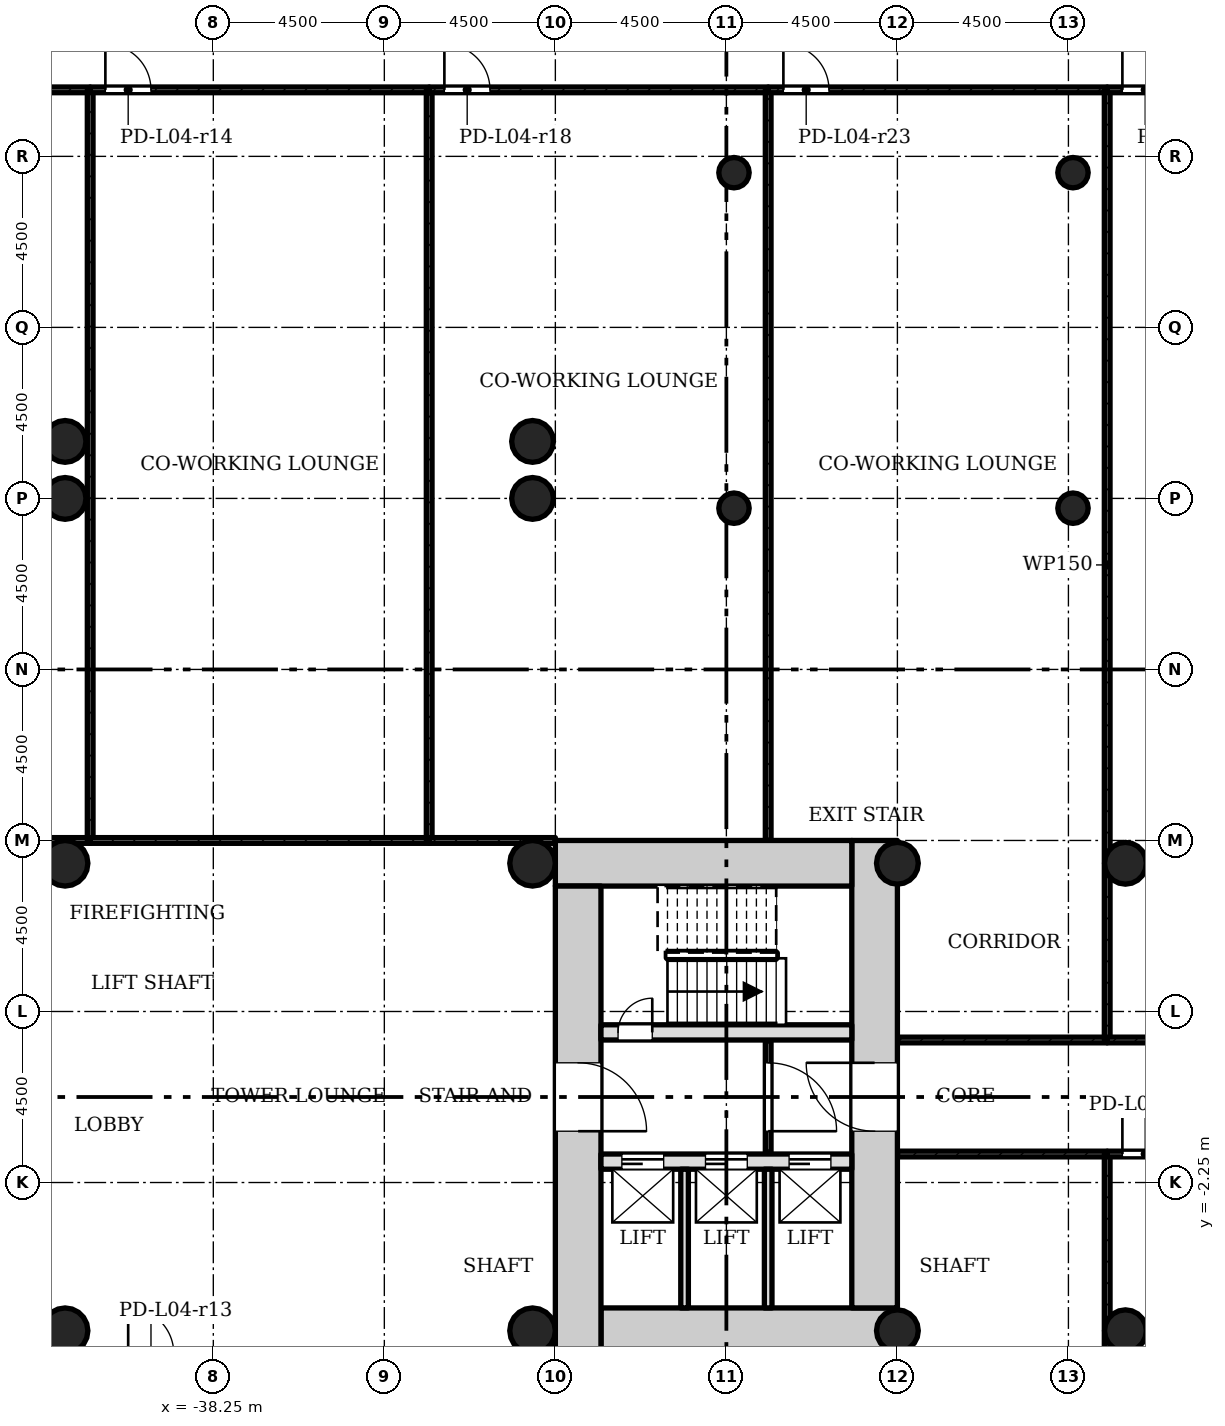
"""IFC4 building model, lengths in metres.
Left out: names, types, materials, properties, quantities, classifications, styles, units other than length and angle.
Written with IfcOpenShell. Run it as: python <this file> out.ifc"""

import sys

from ifc_helpers import new_model, si_unit, direction, frame, frame_2d, origin, origin_2d, place, context, subcontext, project, spatial, rectangle, hollow_circle, extrude, element, fill, save


model = new_model("IFC4")
c1 = context("Model", 3, precision=1e-05, world=origin(), true_north=direction((0.0, 1.0)))
c2 = subcontext(c1, "Body", "Model", "MODEL_VIEW")
j1 = project(units=[si_unit("LENGTHUNIT", "METRE"), si_unit("PLANEANGLEUNIT", "RADIAN")], contexts=[c1])
p1 = place(None, origin())
s1 = spatial("IfcSite", under=j1, at=p1, CompositionType="ELEMENT")
p2 = place(p1, origin())
s2 = spatial("IfcBuilding", under=s1, at=p2, CompositionType="ELEMENT")
p3 = place(p2, frame((0.0, 0.0, 20.0)))
s3 = spatial("IfcBuildingStorey", under=s2, at=p3, CompositionType="ELEMENT", Elevation=20.0)
p4 = place(p3, frame((-28.05, -6.15, 0.0), z_axis=(0.0, 0.0, 1.0), x_axis=(1.0, 0.0, 0.0)))
e1 = element("IfcWall", 1, at=p4, inside=s3, PredefinedType="SHEAR", context=c2, shape_type="SweptSolid", body=[
    extrude(rectangle(XDim=7.8, YDim=1.2, at=frame_2d((3.9, 0.0))), origin(), (0.0, 0.0, 1.0), 4.5),
])
p5 = place(p3, frame((-20.85, -5.55, 0.0), z_axis=(0.0, 0.0, 1.0), x_axis=(0.0, 1.0, 0.0)))
e2 = element("IfcWall", 2, at=p5, inside=s3, PredefinedType="SHEAR", context=c2, shape_type="SweptSolid", body=[
    extrude(rectangle(XDim=12.3, YDim=1.2, at=frame_2d((6.15, 0.0))), origin(), (0.0, 0.0, 1.0), 4.5),
])
p6 = place(p5, frame((4.65, 0.0, 0.0)))
e3 = element("IfcOpeningElement", 3, at=p6, cuts=e2, PredefinedType="OPENING", context=c2, shape_type="SweptSolid", body=[
    extrude(rectangle(XDim=1.8, YDim=2.1, at=frame_2d((0.9, 1.05))), frame((0.0, 0.61, 0.0), z_axis=(0.0, -1.0, 0.0), x_axis=(1.0, 0.0, 0.0)), (0.0, 0.0, 1.0), 1.22),
])
p7 = place(p3, frame((-21.45, 6.15, 0.0), z_axis=(0.0, 0.0, 1.0), x_axis=(-1.0, 0.0, 0.0)))
e4 = element("IfcWall", 4, at=p7, inside=s3, PredefinedType="SHEAR", context=c2, shape_type="SweptSolid", body=[
    extrude(rectangle(XDim=7.8, YDim=1.2, at=frame_2d((3.9, 0.0))), origin(), (0.0, 0.0, 1.0), 4.5),
])
p8 = place(p3, frame((-28.65, 5.55, 0.0), z_axis=(0.0, 0.0, 1.0), x_axis=(0.0, -1.0, 0.0)))
e5 = element("IfcWall", 5, at=p8, inside=s3, PredefinedType="SHEAR", context=c2, shape_type="SweptSolid", body=[
    extrude(rectangle(XDim=12.3, YDim=1.2, at=frame_2d((6.15, 0.0))), origin(), (0.0, 0.0, 1.0), 4.5),
])
p9 = place(p8, frame((4.65, 0.0, 0.0)))
e6 = element("IfcOpeningElement", 6, at=p9, cuts=e5, PredefinedType="OPENING", context=c2, shape_type="SweptSolid", body=[
    extrude(rectangle(XDim=1.8, YDim=2.1, at=frame_2d((0.9, 1.05))), frame((0.0, 0.61, 0.0), z_axis=(0.0, -1.0, 0.0), x_axis=(1.0, 0.0, 0.0)), (0.0, 0.0, 1.0), 1.22),
])
p10 = place(p3, frame((-28.05, -1.7, 0.0), z_axis=(0.0, 0.0, 1.0), x_axis=(1.0, 0.0, 0.0)))
e7 = element("IfcWall", 7, at=p10, inside=s3, PredefinedType="SHEAR", context=c2, shape_type="SweptSolid", body=[
    extrude(rectangle(XDim=6.6, YDim=0.4, at=frame_2d((3.3, 0.0))), origin(), (0.0, 0.0, 1.0), 4.5),
])
p11 = place(p10, frame((0.55, 0.0, 0.0)))
e8 = element("IfcOpeningElement", 8, at=p11, cuts=e7, PredefinedType="OPENING", context=c2, shape_type="SweptSolid", body=[
    extrude(rectangle(XDim=1.1, YDim=2.1, at=frame_2d((0.55, 1.05))), frame((0.0, 0.21, 0.0), z_axis=(0.0, -1.0, 0.0), x_axis=(1.0, 0.0, 0.0)), (0.0, 0.0, 1.0), 0.42),
])
p12 = place(p10, frame((2.75, 0.0, 0.0)))
e9 = element("IfcOpeningElement", 9, at=p12, cuts=e7, PredefinedType="OPENING", context=c2, shape_type="SweptSolid", body=[
    extrude(rectangle(XDim=1.1, YDim=2.1, at=frame_2d((0.55, 1.05))), frame((0.0, 0.21, 0.0), z_axis=(0.0, -1.0, 0.0), x_axis=(1.0, 0.0, 0.0)), (0.0, 0.0, 1.0), 0.42),
])
p13 = place(p10, frame((4.95, 0.0, 0.0)))
e10 = element("IfcOpeningElement", 10, at=p13, cuts=e7, PredefinedType="OPENING", context=c2, shape_type="SweptSolid", body=[
    extrude(rectangle(XDim=1.1, YDim=2.1, at=frame_2d((0.55, 1.05))), frame((0.0, 0.21, 0.0), z_axis=(0.0, -1.0, 0.0), x_axis=(1.0, 0.0, 0.0)), (0.0, 0.0, 1.0), 0.42),
])
p14 = place(p3, frame((-28.05, 1.7, 0.0), z_axis=(0.0, 0.0, 1.0), x_axis=(1.0, 0.0, 0.0)))
e11 = element("IfcWall", 11, at=p14, inside=s3, PredefinedType="SHEAR", context=c2, shape_type="SweptSolid", body=[
    extrude(rectangle(XDim=6.6, YDim=0.4, at=frame_2d((3.3, 0.0))), origin(), (0.0, 0.0, 1.0), 4.5),
])
p15 = place(p14, frame((0.45, 0.0, 0.0)))
e12 = element("IfcOpeningElement", 12, at=p15, cuts=e11, PredefinedType="OPENING", context=c2, shape_type="SweptSolid", body=[
    extrude(rectangle(XDim=0.9, YDim=2.1, at=frame_2d((0.45, 1.05))), frame((0.0, 0.21, 0.0), z_axis=(0.0, -1.0, 0.0), x_axis=(1.0, 0.0, 0.0)), (0.0, 0.0, 1.0), 0.42),
])
for number, where, z_axis, x_axis in (
    (13, (-20.25, -6.15, 0.0), (0.0, 0.0, 1.0), (1.0, 0.0, 0.0)),
    (14, (-20.25, 6.15, 0.0), (0.0, 0.0, 1.0), (1.0, 0.0, 0.0)),
    (15, (-14.25, -6.15, 0.0), (0.0, 0.0, 1.0), (1.0, 0.0, 0.0)),
    (16, (-14.25, 6.15, 0.0), (0.0, 0.0, 1.0), (1.0, 0.0, 0.0)),
    (17, (-29.85, 15.75, 0.0), (0.0, 0.0, 1.0), (1.0, 0.0, 0.0)),
    (18, (-42.15, 15.75, 0.0), (0.0, 0.0, 1.0), (1.0, 0.0, 0.0)),
    (19, (-29.85, 17.25, 0.0), (0.0, 0.0, 1.0), (1.0, 0.0, 0.0)),
    (20, (-42.15, 17.25, 0.0), (0.0, 0.0, 1.0), (1.0, 0.0, 0.0)),
):
    element("IfcColumn", number, at=place(p3, frame(where, z_axis=z_axis, x_axis=x_axis)), inside=s3, PredefinedType="COLUMN", context=c2, shape_type="SweptSolid", body=[
        extrude(hollow_circle(Radius=0.55, WallThickness=0.04, at=origin_2d()), origin(), (0.0, 0.0, 1.0), 4.5),
    ])
for number, where, z_axis, x_axis in (
    (21, (-42.15, -6.15, 0.0), (0.0, 0.0, 1.0), (1.0, 0.0, 0.0)),
    (22, (-29.85, -6.15, 0.0), (0.0, 0.0, 1.0), (1.0, 0.0, 0.0)),
    (23, (-29.85, 6.15, 0.0), (0.0, 0.0, 1.0), (1.0, 0.0, 0.0)),
    (24, (-42.15, 6.15, 0.0), (0.0, 0.0, 1.0), (1.0, 0.0, 0.0)),
):
    element("IfcColumn", number, at=place(p3, frame(where, z_axis=z_axis, x_axis=x_axis)), inside=s3, PredefinedType="COLUMN", context=c2, shape_type="SweptSolid", body=[
        extrude(hollow_circle(Radius=0.6, WallThickness=0.045, at=origin_2d()), origin(), (0.0, 0.0, 1.0), 4.5),
    ])
for number, where, z_axis, x_axis in (
    (25, (-24.55, 15.493, 0.0), (0.0, 0.0, 1.0), (1.0, 0.0, 0.0)),
    (26, (-15.63, 15.493, 0.0), (0.0, 0.0, 1.0), (1.0, 0.0, 0.0)),
    (27, (-24.55, 24.321, 0.0), (0.0, 0.0, 1.0), (1.0, 0.0, 0.0)),
    (28, (-15.63, 24.321, 0.0), (0.0, 0.0, 1.0), (1.0, 0.0, 0.0)),
):
    element("IfcColumn", number, at=place(p3, frame(where, z_axis=z_axis, x_axis=x_axis)), inside=s3, PredefinedType="COLUMN", context=c2, shape_type="SweptSolid", body=[
        extrude(hollow_circle(Radius=0.4, WallThickness=0.028, at=origin_2d()), origin(), (0.0, 0.0, 1.0), 4.08),
    ])
p16 = place(p3, frame((-23.65, -1.5, 0.0), z_axis=(0.0, 0.0, 1.0), x_axis=(0.0, 1.0, 0.0)))
e29 = element("IfcWall", 29, at=p16, inside=s3, PredefinedType="PARTITIONING", context=c2, shape_type="SweptSolid", body=[
    extrude(rectangle(XDim=3.0, YDim=0.15, at=frame_2d((1.5, 0.0))), origin(), (0.0, 0.0, 1.0), 4.075),
])
p17 = place(p16, frame((0.6, 0.0, 0.0)))
e30 = element("IfcOpeningElement", 30, at=p17, cuts=e29, PredefinedType="OPENING", context=c2, shape_type="SweptSolid", body=[
    extrude(rectangle(XDim=1.8, YDim=2.1, at=frame_2d((0.9, 1.05))), frame((0.0, 0.085, 0.0), z_axis=(0.0, -1.0, 0.0), x_axis=(1.0, 0.0, 0.0)), (0.0, 0.0, 1.0), 0.17),
])
for number, where, z_axis, x_axis in (
    (31, (-25.85, -5.55, 0.0), (0.0, 0.0, 1.0), (0.0, 1.0, 0.0)),
    (32, (-23.65, -5.55, 0.0), (0.0, 0.0, 1.0), (0.0, 1.0, 0.0)),
):
    element("IfcWall", number, at=place(p3, frame(where, z_axis=z_axis, x_axis=x_axis)), inside=s3, PredefinedType="SOLIDWALL", context=c2, shape_type="SweptSolid", body=[
        extrude(rectangle(XDim=3.65, YDim=0.2, at=frame_2d((1.825, 0.0))), origin(), (0.0, 0.0, 1.0), 4.075),
    ])
p18 = place(p3, frame((-50.41, 26.5, 0.0), z_axis=(0.0, 0.0, 1.0), x_axis=(1.0, 0.0, 0.0)))
e33 = element("IfcWall", 33, at=p18, inside=s3, PredefinedType="PARTITIONING", context=c2, shape_type="SweptSolid", body=[
    extrude(rectangle(XDim=8.92, YDim=0.15, at=frame_2d((4.46, 0.0))), origin(), (0.0, 0.0, 1.0), 4.075),
])
p19 = place(p18, frame((0.4, 0.0, 0.0)))
e34 = element("IfcOpeningElement", 34, at=p19, cuts=e33, PredefinedType="OPENING", context=c2, shape_type="SweptSolid", body=[
    extrude(rectangle(XDim=1.2, YDim=2.1, at=frame_2d((0.6, 1.05))), frame((0.0, 0.085, 0.0), z_axis=(0.0, -1.0, 0.0), x_axis=(1.0, 0.0, 0.0)), (0.0, 0.0, 1.0), 0.17),
])
p20 = place(p3, frame((-41.49, 6.75, 0.0), z_axis=(0.0, 0.0, 1.0), x_axis=(-1.0, 0.0, 0.0)))
e35 = element("IfcWall", 35, at=p20, inside=s3, PredefinedType="PARTITIONING", context=c2, shape_type="SweptSolid", body=[
    extrude(rectangle(XDim=1.26, YDim=0.15, at=frame_2d((0.63, 0.0))), origin(), (0.0, 0.0, 1.0), 4.075),
])
p21 = place(p3, frame((-41.49, 26.5, 0.0), z_axis=(0.0, 0.0, 1.0), x_axis=(0.0, -1.0, 0.0)))
e36 = element("IfcWall", 36, at=p21, inside=s3, PredefinedType="PARTITIONING", context=c2, shape_type="SweptSolid", body=[
    extrude(rectangle(XDim=19.75, YDim=0.15, at=frame_2d((9.875, 0.0))), origin(), (0.0, 0.0, 1.0), 4.075),
])
p22 = place(p3, frame((-41.49, 26.5, 0.0), z_axis=(0.0, 0.0, 1.0), x_axis=(1.0, 0.0, 0.0)))
e37 = element("IfcWall", 37, at=p22, inside=s3, PredefinedType="PARTITIONING", context=c2, shape_type="SweptSolid", body=[
    extrude(rectangle(XDim=8.92, YDim=0.15, at=frame_2d((4.46, 0.0))), origin(), (0.0, 0.0, 1.0), 4.075),
])
p23 = place(p22, frame((0.4, 0.0, 0.0)))
e38 = element("IfcOpeningElement", 38, at=p23, cuts=e37, PredefinedType="OPENING", context=c2, shape_type="SweptSolid", body=[
    extrude(rectangle(XDim=1.2, YDim=2.1, at=frame_2d((0.6, 1.05))), frame((0.0, 0.085, 0.0), z_axis=(0.0, -1.0, 0.0), x_axis=(1.0, 0.0, 0.0)), (0.0, 0.0, 1.0), 0.17),
])
p24 = place(p3, frame((-32.57, 6.75, 0.0), z_axis=(0.0, 0.0, 1.0), x_axis=(-1.0, 0.0, 0.0)))
e39 = element("IfcWall", 39, at=p24, inside=s3, PredefinedType="PARTITIONING", context=c2, shape_type="SweptSolid", body=[
    extrude(rectangle(XDim=8.92, YDim=0.15, at=frame_2d((4.46, 0.0))), origin(), (0.0, 0.0, 1.0), 4.075),
])
p25 = place(p3, frame((-32.57, 26.5, 0.0), z_axis=(0.0, 0.0, 1.0), x_axis=(0.0, -1.0, 0.0)))
e40 = element("IfcWall", 40, at=p25, inside=s3, PredefinedType="PARTITIONING", context=c2, shape_type="SweptSolid", body=[
    extrude(rectangle(XDim=19.75, YDim=0.15, at=frame_2d((9.875, 0.0))), origin(), (0.0, 0.0, 1.0), 4.075),
])
p26 = place(p3, frame((-29.25, 6.75, 0.0), z_axis=(0.0, 0.0, 1.0), x_axis=(-1.0, 0.0, 0.0)))
e41 = element("IfcWall", 41, at=p26, inside=s3, PredefinedType="PARTITIONING", context=c2, shape_type="SweptSolid", body=[
    extrude(rectangle(XDim=3.32, YDim=0.15, at=frame_2d((1.66, 0.0))), origin(), (0.0, 0.0, 1.0), 4.075),
])
p27 = place(p3, frame((-32.57, 26.5, 0.0), z_axis=(0.0, 0.0, 1.0), x_axis=(1.0, 0.0, 0.0)))
e42 = element("IfcWall", 42, at=p27, inside=s3, PredefinedType="PARTITIONING", context=c2, shape_type="SweptSolid", body=[
    extrude(rectangle(XDim=8.92, YDim=0.15, at=frame_2d((4.46, 0.0))), origin(), (0.0, 0.0, 1.0), 4.075),
])
p28 = place(p27, frame((0.4, 0.0, 0.0)))
e43 = element("IfcOpeningElement", 43, at=p28, cuts=e42, PredefinedType="OPENING", context=c2, shape_type="SweptSolid", body=[
    extrude(rectangle(XDim=1.2, YDim=2.1, at=frame_2d((0.6, 1.05))), frame((0.0, 0.085, 0.0), z_axis=(0.0, -1.0, 0.0), x_axis=(1.0, 0.0, 0.0)), (0.0, 0.0, 1.0), 0.17),
])
p29 = place(p3, frame((-23.65, 26.5, 0.0), z_axis=(0.0, 0.0, 1.0), x_axis=(0.0, -1.0, 0.0)))
e44 = element("IfcWall", 44, at=p29, inside=s3, PredefinedType="PARTITIONING", context=c2, shape_type="SweptSolid", body=[
    extrude(rectangle(XDim=19.75, YDim=0.15, at=frame_2d((9.875, 0.0))), origin(), (0.0, 0.0, 1.0), 4.075),
])
p30 = place(p3, frame((-20.25, -1.5, 0.0), z_axis=(0.0, 0.0, 1.0), x_axis=(1.0, 0.0, 0.0)))
e45 = element("IfcWall", 45, at=p30, inside=s3, PredefinedType="PARTITIONING", context=c2, shape_type="SweptSolid", body=[
    extrude(rectangle(XDim=5.52, YDim=0.15, at=frame_2d((2.76, 0.0))), origin(), (0.0, 0.0, 1.0), 4.075),
])
p31 = place(p3, frame((-14.73, -1.5, 0.0), z_axis=(0.0, 0.0, 1.0), x_axis=(0.0, -1.0, 0.0)))
e46 = element("IfcWall", 46, at=p31, inside=s3, PredefinedType="PARTITIONING", context=c2, shape_type="SweptSolid", body=[
    extrude(rectangle(XDim=22.0, YDim=0.15, at=frame_2d((11.0, 0.0))), origin(), (0.0, 0.0, 1.0), 4.075),
])
p32 = place(p3, frame((-23.65, 26.5, 0.0), z_axis=(0.0, 0.0, 1.0), x_axis=(1.0, 0.0, 0.0)))
e47 = element("IfcWall", 47, at=p32, inside=s3, PredefinedType="PARTITIONING", context=c2, shape_type="SweptSolid", body=[
    extrude(rectangle(XDim=8.92, YDim=0.15, at=frame_2d((4.46, 0.0))), origin(), (0.0, 0.0, 1.0), 4.075),
])
p33 = place(p32, frame((0.4, 0.0, 0.0)))
e48 = element("IfcOpeningElement", 48, at=p33, cuts=e47, PredefinedType="OPENING", context=c2, shape_type="SweptSolid", body=[
    extrude(rectangle(XDim=1.2, YDim=2.1, at=frame_2d((0.6, 1.05))), frame((0.0, 0.085, 0.0), z_axis=(0.0, -1.0, 0.0), x_axis=(1.0, 0.0, 0.0)), (0.0, 0.0, 1.0), 0.17),
])
p34 = place(p3, frame((-14.73, 1.5, 0.0), z_axis=(0.0, 0.0, 1.0), x_axis=(-1.0, 0.0, 0.0)))
e49 = element("IfcWall", 49, at=p34, inside=s3, PredefinedType="PARTITIONING", context=c2, shape_type="SweptSolid", body=[
    extrude(rectangle(XDim=5.52, YDim=0.15, at=frame_2d((2.76, 0.0))), origin(), (0.0, 0.0, 1.0), 4.075),
])
p35 = place(p3, frame((-14.73, 26.5, 0.0), z_axis=(0.0, 0.0, 1.0), x_axis=(0.0, -1.0, 0.0)))
e50 = element("IfcWall", 50, at=p35, inside=s3, PredefinedType="PARTITIONING", context=c2, shape_type="SweptSolid", body=[
    extrude(rectangle(XDim=25.0, YDim=0.15, at=frame_2d((12.5, 0.0))), origin(), (0.0, 0.0, 1.0), 4.075),
])
p36 = place(p3, frame((-14.73, -1.5, 0.0), z_axis=(0.0, 0.0, 1.0), x_axis=(1.0, 0.0, 0.0)))
e51 = element("IfcWall", 51, at=p36, inside=s3, PredefinedType="PARTITIONING", context=c2, shape_type="SweptSolid", body=[
    extrude(rectangle(XDim=8.92, YDim=0.15, at=frame_2d((4.46, 0.0))), origin(), (0.0, 0.0, 1.0), 4.075),
])
p37 = place(p36, frame((0.4, 0.0, 0.0)))
e52 = element("IfcOpeningElement", 52, at=p37, cuts=e51, PredefinedType="OPENING", context=c2, shape_type="SweptSolid", body=[
    extrude(rectangle(XDim=1.2, YDim=2.1, at=frame_2d((0.6, 1.05))), frame((0.0, 0.085, 0.0), z_axis=(0.0, -1.0, 0.0), x_axis=(1.0, 0.0, 0.0)), (0.0, 0.0, 1.0), 0.17),
])
p38 = place(p3, frame((-14.73, 26.5, 0.0), z_axis=(0.0, 0.0, 1.0), x_axis=(1.0, 0.0, 0.0)))
e53 = element("IfcWall", 53, at=p38, inside=s3, PredefinedType="PARTITIONING", context=c2, shape_type="SweptSolid", body=[
    extrude(rectangle(XDim=8.92, YDim=0.15, at=frame_2d((4.46, 0.0))), origin(), (0.0, 0.0, 1.0), 4.075),
])
p39 = place(p38, frame((0.4, 0.0, 0.0)))
e54 = element("IfcOpeningElement", 54, at=p39, cuts=e53, PredefinedType="OPENING", context=c2, shape_type="SweptSolid", body=[
    extrude(rectangle(XDim=1.2, YDim=2.1, at=frame_2d((0.6, 1.05))), frame((0.0, 0.085, 0.0), z_axis=(0.0, -1.0, 0.0), x_axis=(1.0, 0.0, 0.0)), (0.0, 0.0, 1.0), 0.17),
])
p40 = place(p3, frame((-5.81, 1.5, 0.0), z_axis=(0.0, 0.0, 1.0), x_axis=(-1.0, 0.0, 0.0)))
e55 = element("IfcWall", 55, at=p40, inside=s3, PredefinedType="PARTITIONING", context=c2, shape_type="SweptSolid", body=[
    extrude(rectangle(XDim=8.92, YDim=0.15, at=frame_2d((4.46, 0.0))), origin(), (0.0, 0.0, 1.0), 4.075),
])
p41 = place(p17, origin())
e56 = element("IfcDoor", 56, at=p41, inside=s3, OperationType="SINGLE_SWING_LEFT", PredefinedType="DOOR", context=c2, shape_type="SweptSolid", body=[
    extrude(rectangle(XDim=1.8, YDim=2.1, at=frame_2d((0.9, 1.05))), frame((0.0, 0.025, 0.0), z_axis=(0.0, -1.0, 0.0), x_axis=(1.0, 0.0, 0.0)), (0.0, 0.0, 1.0), 0.05),
])
fill(e30, e56)
p42 = place(p23, origin())
e57 = element("IfcDoor", 57, at=p42, inside=s3, OperationType="SINGLE_SWING_RIGHT", PredefinedType="DOOR", context=c2, shape_type="SweptSolid", body=[
    extrude(rectangle(XDim=1.2, YDim=2.1, at=frame_2d((0.6, 1.05))), frame((0.0, 0.025, 0.0), z_axis=(0.0, -1.0, 0.0), x_axis=(1.0, 0.0, 0.0)), (0.0, 0.0, 1.0), 0.05),
])
fill(e38, e57)
p43 = place(p28, origin())
e58 = element("IfcDoor", 58, at=p43, inside=s3, OperationType="SINGLE_SWING_RIGHT", PredefinedType="DOOR", context=c2, shape_type="SweptSolid", body=[
    extrude(rectangle(XDim=1.2, YDim=2.1, at=frame_2d((0.6, 1.05))), frame((0.0, 0.025, 0.0), z_axis=(0.0, -1.0, 0.0), x_axis=(1.0, 0.0, 0.0)), (0.0, 0.0, 1.0), 0.05),
])
fill(e43, e58)
p44 = place(p33, origin())
e59 = element("IfcDoor", 59, at=p44, inside=s3, OperationType="SINGLE_SWING_RIGHT", PredefinedType="DOOR", context=c2, shape_type="SweptSolid", body=[
    extrude(rectangle(XDim=1.2, YDim=2.1, at=frame_2d((0.6, 1.05))), frame((0.0, 0.025, 0.0), z_axis=(0.0, -1.0, 0.0), x_axis=(1.0, 0.0, 0.0)), (0.0, 0.0, 1.0), 0.05),
])
fill(e48, e59)
p45 = place(p37, origin())
e60 = element("IfcDoor", 60, at=p45, inside=s3, OperationType="SINGLE_SWING_RIGHT", PredefinedType="DOOR", context=c2, shape_type="SweptSolid", body=[
    extrude(rectangle(XDim=1.2, YDim=2.1, at=frame_2d((0.6, 1.05))), frame((0.0, 0.025, 0.0), z_axis=(0.0, -1.0, 0.0), x_axis=(1.0, 0.0, 0.0)), (0.0, 0.0, 1.0), 0.05),
])
fill(e52, e60)
p46 = place(p39, origin())
e61 = element("IfcDoor", 61, at=p46, inside=s3, OperationType="SINGLE_SWING_RIGHT", PredefinedType="DOOR", context=c2, shape_type="SweptSolid", body=[
    extrude(rectangle(XDim=1.2, YDim=2.1, at=frame_2d((0.6, 1.05))), frame((0.0, 0.025, 0.0), z_axis=(0.0, -1.0, 0.0), x_axis=(1.0, 0.0, 0.0)), (0.0, 0.0, 1.0), 0.05),
])
fill(e54, e61)
p47 = place(p15, origin())
e62 = element("IfcDoor", 62, at=p47, inside=s3, OperationType="SINGLE_SWING_LEFT", PredefinedType="DOOR", context=c2, shape_type="SweptSolid", body=[
    extrude(rectangle(XDim=0.9, YDim=2.1, at=frame_2d((0.45, 1.05))), frame((0.0, 0.025, 0.0), z_axis=(0.0, -1.0, 0.0), x_axis=(1.0, 0.0, 0.0)), (0.0, 0.0, 1.0), 0.05),
])
fill(e12, e62)
p48 = place(p11, origin())
e63 = element("IfcDoor", 63, at=p48, inside=s3, OperationType="SLIDING_TO_LEFT", PredefinedType="DOOR", context=c2, shape_type="SweptSolid", body=[
    extrude(rectangle(XDim=1.1, YDim=2.1, at=frame_2d((0.55, 1.05))), frame((0.0, 0.025, 0.0), z_axis=(0.0, -1.0, 0.0), x_axis=(1.0, 0.0, 0.0)), (0.0, 0.0, 1.0), 0.05),
])
fill(e8, e63)
p49 = place(p12, origin())
e64 = element("IfcDoor", 64, at=p49, inside=s3, OperationType="SLIDING_TO_LEFT", PredefinedType="DOOR", context=c2, shape_type="SweptSolid", body=[
    extrude(rectangle(XDim=1.1, YDim=2.1, at=frame_2d((0.55, 1.05))), frame((0.0, 0.025, 0.0), z_axis=(0.0, -1.0, 0.0), x_axis=(1.0, 0.0, 0.0)), (0.0, 0.0, 1.0), 0.05),
])
fill(e9, e64)
p50 = place(p13, origin())
e65 = element("IfcDoor", 65, at=p50, inside=s3, OperationType="SLIDING_TO_LEFT", PredefinedType="DOOR", context=c2, shape_type="SweptSolid", body=[
    extrude(rectangle(XDim=1.1, YDim=2.1, at=frame_2d((0.55, 1.05))), frame((0.0, 0.025, 0.0), z_axis=(0.0, -1.0, 0.0), x_axis=(1.0, 0.0, 0.0)), (0.0, 0.0, 1.0), 0.05),
])
fill(e10, e65)
p51 = place(p9, origin())
e66 = element("IfcDoor", 66, at=p51, inside=s3, OperationType="SINGLE_SWING_LEFT", PredefinedType="DOOR", context=c2, shape_type="SweptSolid", body=[
    extrude(rectangle(XDim=1.8, YDim=2.1, at=frame_2d((0.9, 1.05))), frame((0.0, 0.025, 0.0), z_axis=(0.0, -1.0, 0.0), x_axis=(1.0, 0.0, 0.0)), (0.0, 0.0, 1.0), 0.05),
])
fill(e6, e66)
p52 = place(p6, origin())
e67 = element("IfcDoor", 67, at=p52, inside=s3, OperationType="SINGLE_SWING_LEFT", PredefinedType="DOOR", context=c2, shape_type="SweptSolid", body=[
    extrude(rectangle(XDim=1.8, YDim=2.1, at=frame_2d((0.9, 1.05))), frame((0.0, 0.025, 0.0), z_axis=(0.0, -1.0, 0.0), x_axis=(1.0, 0.0, 0.0)), (0.0, 0.0, 1.0), 0.05),
])
fill(e3, e67)
save(model, sys.argv[1])
